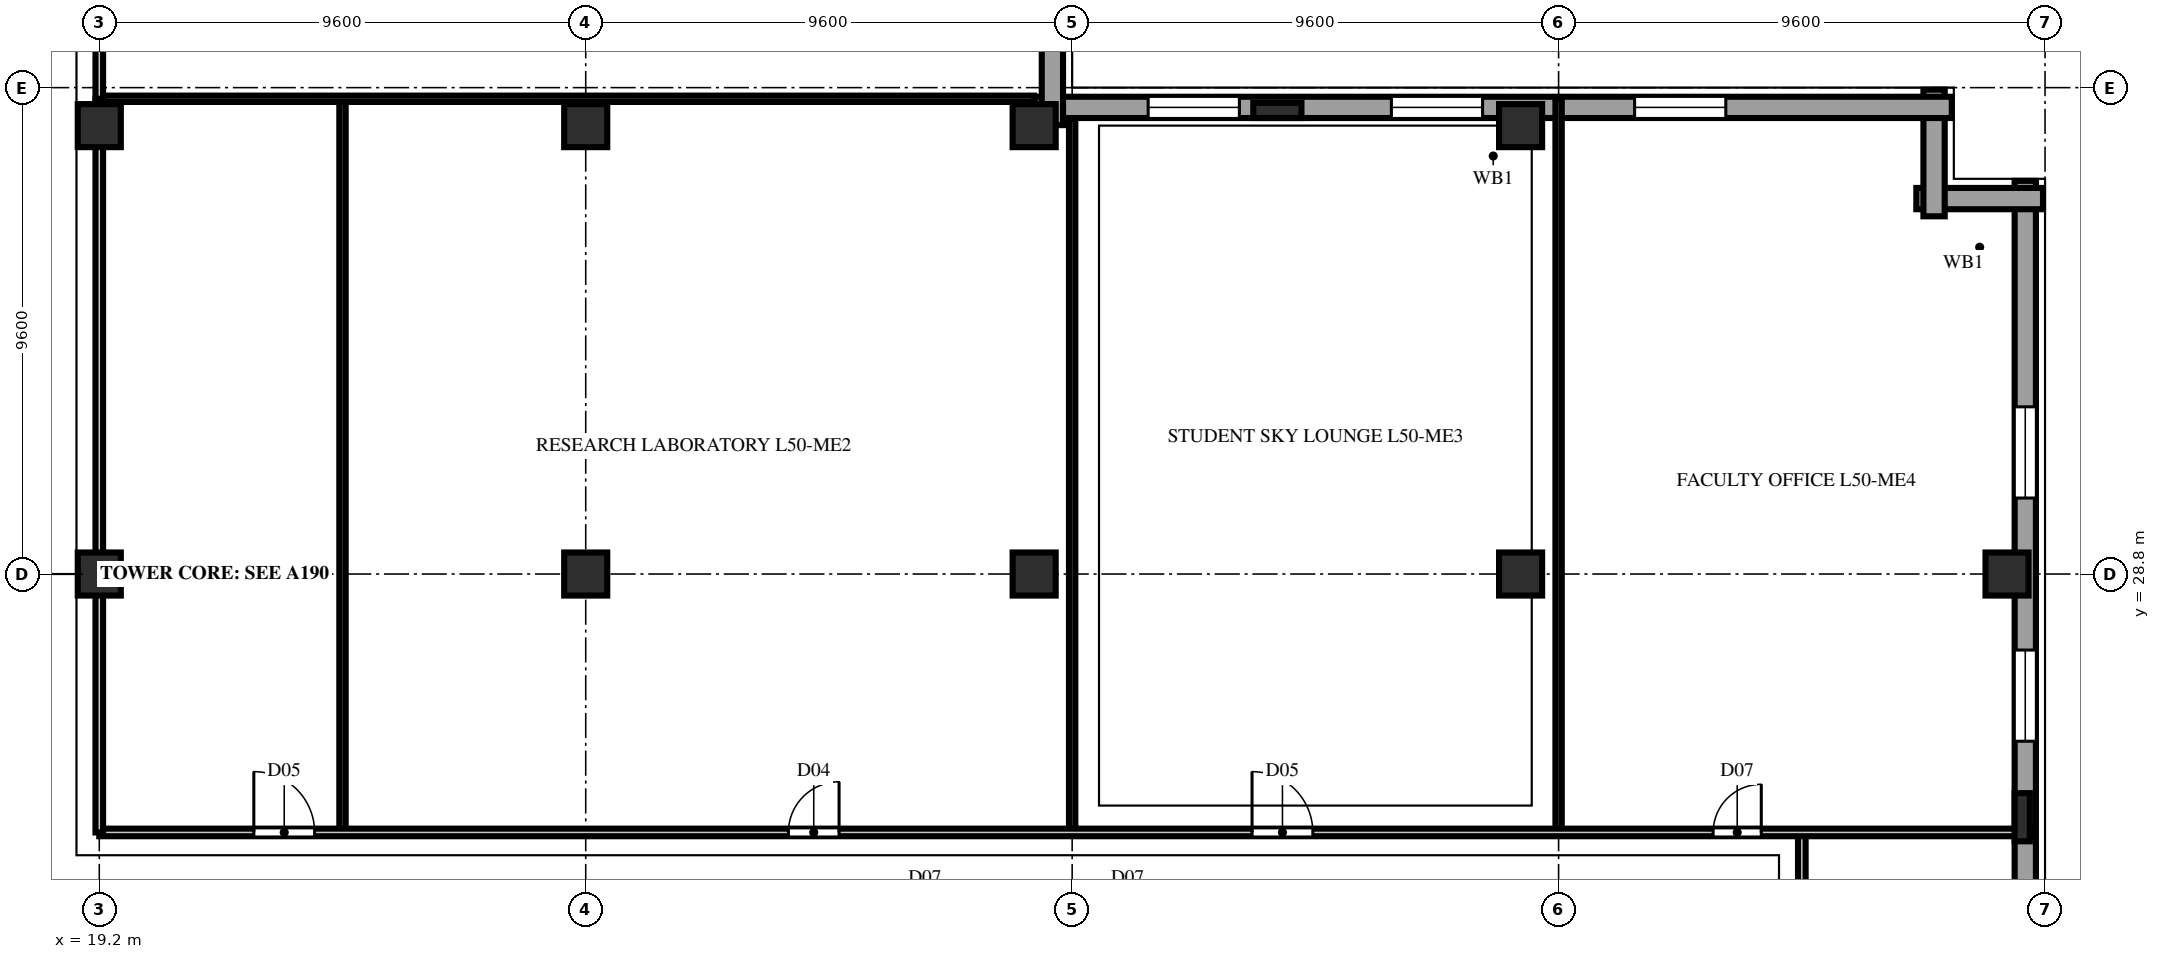
"""IFC4 building model, lengths in metres.
Left out: names, types, materials, properties, quantities, classifications, styles, units other than length and angle.
Written with IfcOpenShell. Run it as: python <this file> out.ifc"""

import sys

from ifc_helpers import new_model, si_unit, direction, frame, frame_2d, origin, origin_2d, place, context, subcontext, project, spatial, rectangle, extrude, element, fill, save


model = new_model("IFC4")
c1 = context("Model", 3, precision=1e-05, world=origin(), true_north=direction((0.0, 1.0)))
c2 = subcontext(c1, "Body", "Model", "MODEL_VIEW")
j1 = project(units=[si_unit("LENGTHUNIT", "METRE"), si_unit("PLANEANGLEUNIT", "RADIAN")], contexts=[c1])
p1 = place(None, origin())
s1 = spatial("IfcSite", under=j1, at=p1, CompositionType="ELEMENT")
p2 = place(p1, origin())
s2 = spatial("IfcBuilding", under=s1, at=p2, CompositionType="ELEMENT")
p3 = place(p2, frame((0.0, 0.0, 199.0)))
s3 = spatial("IfcBuildingStorey", under=s2, at=p3, CompositionType="ELEMENT", Elevation=199.0)
for number, where, z_axis, x_axis in (
    (1, (19.2, 28.8, 0.0), (0.0, 0.0, 1.0), (1.0, 0.0, 0.0)),
    (2, (19.2, 37.65, 0.0), (0.0, 0.0, 1.0), (1.0, 0.0, 0.0)),
    (3, (28.8, 28.8, 0.0), (0.0, 0.0, 1.0), (1.0, 0.0, 0.0)),
    (4, (28.8, 37.65, 0.0), (0.0, 0.0, 1.0), (1.0, 0.0, 0.0)),
    (5, (37.65, 28.8, 0.0), (0.0, 0.0, 1.0), (1.0, 0.0, 0.0)),
    (6, (37.65, 37.65, 0.0), (0.0, 0.0, 1.0), (1.0, 0.0, 0.0)),
    (7, (47.25, 28.8, 0.0), (0.0, 0.0, 1.0), (1.0, 0.0, 0.0)),
    (8, (47.25, 37.65, 0.0), (0.0, 0.0, 1.0), (1.0, 0.0, 0.0)),
    (9, (56.85, 28.8, 0.0), (0.0, 0.0, 1.0), (1.0, 0.0, 0.0)),
):
    element("IfcColumn", number, at=place(p3, frame(where, z_axis=z_axis, x_axis=x_axis)), inside=s3, PredefinedType="COLUMN", context=c2, shape_type="SweptSolid", body=[
        extrude(rectangle(XDim=0.85, YDim=0.85, at=origin_2d()), origin(), (0.0, 0.0, 1.0), 3.8),
    ])
for number, where, z_axis, x_axis in (
    (10, (57.15, 24.0, 0.0), (0.0, 0.0, 1.0), (0.0, 1.0, 0.0)),
    (11, (42.45, 37.95, 0.0), (0.0, 0.0, 1.0), (1.0, 0.0, 0.0)),
):
    element("IfcColumn", number, at=place(p3, frame(where, z_axis=z_axis, x_axis=x_axis)), inside=s3, PredefinedType="PILASTER", context=c2, shape_type="SweptSolid", body=[
        extrude(rectangle(XDim=0.95, YDim=0.3, at=origin_2d()), origin(), (0.0, 0.0, 1.0), 3.8),
    ])
p4 = place(p3, frame((57.21, 1.84, 0.0), z_axis=(0.0, 0.0, 1.0), x_axis=(0.0, 1.0, 0.0)))
e12 = element("IfcWall", 12, at=p4, inside=s3, PredefinedType="SOLIDWALL", context=c2, shape_type="SweptSolid", body=[
    extrude(rectangle(XDim=34.72, YDim=0.42, at=frame_2d((17.36, 0.0))), origin(), (0.0, 0.0, 1.0), 3.54),
])
p5 = place(p4, frame((4.46, 0.0, 0.85)))
e13 = element("IfcOpeningElement", 13, at=p5, cuts=e12, PredefinedType="OPENING", context=c2, shape_type="SweptSolid", body=[
    extrude(rectangle(XDim=1.8, YDim=1.85, at=frame_2d((0.9, 0.925))), frame((0.0, 0.222, 0.0), z_axis=(0.0, -1.0, 0.0), x_axis=(1.0, 0.0, 0.0)), (0.0, 0.0, 1.0), 0.444),
])
p6 = place(p4, frame((9.26, 0.0, 0.85)))
e14 = element("IfcOpeningElement", 14, at=p6, cuts=e12, PredefinedType="OPENING", context=c2, shape_type="SweptSolid", body=[
    extrude(rectangle(XDim=1.8, YDim=1.85, at=frame_2d((0.9, 0.925))), frame((0.0, 0.222, 0.0), z_axis=(0.0, -1.0, 0.0), x_axis=(1.0, 0.0, 0.0)), (0.0, 0.0, 1.0), 0.444),
])
p7 = place(p4, frame((14.06, 0.0, 0.85)))
e15 = element("IfcOpeningElement", 15, at=p7, cuts=e12, PredefinedType="OPENING", context=c2, shape_type="SweptSolid", body=[
    extrude(rectangle(XDim=1.8, YDim=1.85, at=frame_2d((0.9, 0.925))), frame((0.0, 0.222, 0.0), z_axis=(0.0, -1.0, 0.0), x_axis=(1.0, 0.0, 0.0)), (0.0, 0.0, 1.0), 0.444),
])
p8 = place(p4, frame((23.66, 0.0, 0.85)))
e16 = element("IfcOpeningElement", 16, at=p8, cuts=e12, PredefinedType="OPENING", context=c2, shape_type="SweptSolid", body=[
    extrude(rectangle(XDim=1.8, YDim=1.85, at=frame_2d((0.9, 0.925))), frame((0.0, 0.222, 0.0), z_axis=(0.0, -1.0, 0.0), x_axis=(1.0, 0.0, 0.0)), (0.0, 0.0, 1.0), 0.444),
])
p9 = place(p4, frame((28.46, 0.0, 0.85)))
e17 = element("IfcOpeningElement", 17, at=p9, cuts=e12, PredefinedType="OPENING", context=c2, shape_type="SweptSolid", body=[
    extrude(rectangle(XDim=1.8, YDim=1.85, at=frame_2d((0.9, 0.925))), frame((0.0, 0.222, 0.0), z_axis=(0.0, -1.0, 0.0), x_axis=(1.0, 0.0, 0.0)), (0.0, 0.0, 1.0), 0.444),
])
for number, where, z_axis, x_axis in (
    (18, (57.56, 36.21, 0.0), (0.0, 0.0, 1.0), (-1.0, 0.0, 0.0)),
    (19, (55.41, 35.86, 0.0), (0.0, 0.0, 1.0), (0.0, 1.0, 0.0)),
):
    element("IfcWall", number, at=place(p3, frame(where, z_axis=z_axis, x_axis=x_axis)), inside=s3, PredefinedType="SOLIDWALL", context=c2, shape_type="SweptSolid", body=[
        extrude(rectangle(XDim=2.5, YDim=0.42, at=frame_2d((1.25, 0.0))), origin(), (0.0, 0.0, 1.0), 3.54),
    ])
p10 = place(p3, frame((55.76, 38.01, 0.0), z_axis=(0.0, 0.0, 1.0), x_axis=(-1.0, 0.0, 0.0)))
e20 = element("IfcWall", 20, at=p10, inside=s3, PredefinedType="SOLIDWALL", context=c2, shape_type="SweptSolid", body=[
    extrude(rectangle(XDim=18.1, YDim=0.42, at=frame_2d((9.05, 0.0))), origin(), (0.0, 0.0, 1.0), 3.54),
])
p11 = place(p10, frame((4.46, 0.0, 0.85)))
e21 = element("IfcOpeningElement", 21, at=p11, cuts=e20, PredefinedType="OPENING", context=c2, shape_type="SweptSolid", body=[
    extrude(rectangle(XDim=1.8, YDim=1.85, at=frame_2d((0.9, 0.925))), frame((0.0, 0.222, 0.0), z_axis=(0.0, -1.0, 0.0), x_axis=(1.0, 0.0, 0.0)), (0.0, 0.0, 1.0), 0.444),
])
p12 = place(p10, frame((9.26, 0.0, 0.85)))
e22 = element("IfcOpeningElement", 22, at=p12, cuts=e20, PredefinedType="OPENING", context=c2, shape_type="SweptSolid", body=[
    extrude(rectangle(XDim=1.8, YDim=1.85, at=frame_2d((0.9, 0.925))), frame((0.0, 0.222, 0.0), z_axis=(0.0, -1.0, 0.0), x_axis=(1.0, 0.0, 0.0)), (0.0, 0.0, 1.0), 0.444),
])
p13 = place(p10, frame((14.06, 0.0, 0.85)))
e23 = element("IfcOpeningElement", 23, at=p13, cuts=e20, PredefinedType="OPENING", context=c2, shape_type="SweptSolid", body=[
    extrude(rectangle(XDim=1.8, YDim=1.85, at=frame_2d((0.9, 0.925))), frame((0.0, 0.222, 0.0), z_axis=(0.0, -1.0, 0.0), x_axis=(1.0, 0.0, 0.0)), (0.0, 0.0, 1.0), 0.444),
])
p14 = place(p3, frame((38.01, 37.66, 0.0), z_axis=(0.0, 0.0, 1.0), x_axis=(0.0, 1.0, 0.0)))
e24 = element("IfcWall", 24, at=p14, inside=s3, PredefinedType="SOLIDWALL", context=c2, shape_type="SweptSolid", body=[
    extrude(rectangle(XDim=18.1, YDim=0.42, at=frame_2d((9.05, 0.0))), origin(), (0.0, 0.0, 1.0), 3.54),
])
p15 = place(p14, frame((2.24, 0.0, 0.85)))
e25 = element("IfcOpeningElement", 25, at=p15, cuts=e24, PredefinedType="OPENING", context=c2, shape_type="SweptSolid", body=[
    extrude(rectangle(XDim=1.8, YDim=1.85, at=frame_2d((0.9, 0.925))), frame((0.0, 0.222, 0.0), z_axis=(0.0, -1.0, 0.0), x_axis=(1.0, 0.0, 0.0)), (0.0, 0.0, 1.0), 0.444),
])
p16 = place(p14, frame((7.04, 0.0, 0.85)))
e26 = element("IfcOpeningElement", 26, at=p16, cuts=e24, PredefinedType="OPENING", context=c2, shape_type="SweptSolid", body=[
    extrude(rectangle(XDim=1.8, YDim=1.85, at=frame_2d((0.9, 0.925))), frame((0.0, 0.222, 0.0), z_axis=(0.0, -1.0, 0.0), x_axis=(1.0, 0.0, 0.0)), (0.0, 0.0, 1.0), 0.444),
])
p17 = place(p14, frame((11.84, 0.0, 0.85)))
e27 = element("IfcOpeningElement", 27, at=p17, cuts=e24, PredefinedType="OPENING", context=c2, shape_type="SweptSolid", body=[
    extrude(rectangle(XDim=1.8, YDim=1.85, at=frame_2d((0.9, 0.925))), frame((0.0, 0.222, 0.0), z_axis=(0.0, -1.0, 0.0), x_axis=(1.0, 0.0, 0.0)), (0.0, 0.0, 1.0), 0.444),
])
p18 = place(p3, frame((52.8, 21.6, 0.0), z_axis=(0.0, 0.0, 1.0), x_axis=(0.0, 1.0, 0.0)))
e28 = element("IfcWall", 28, at=p18, inside=s3, PredefinedType="PARTITIONING", context=c2, shape_type="SweptSolid", body=[
    extrude(rectangle(XDim=2.1, YDim=0.15, at=frame_2d((1.05, 0.0))), origin(), (0.0, 0.0, 1.0), 3.54),
])
p19 = place(p3, frame((24.0, 23.7, 0.0), z_axis=(0.0, 0.0, 1.0), x_axis=(0.0, 1.0, 0.0)))
e29 = element("IfcWall", 29, at=p19, inside=s3, PredefinedType="PARTITIONING", context=c2, shape_type="SweptSolid", body=[
    extrude(rectangle(XDim=14.48, YDim=0.125, at=frame_2d((7.24, 0.0))), origin(), (0.0, 0.0, 1.0), 3.007),
])
p20 = place(p3, frame((38.4, 23.7, 0.0), z_axis=(0.0, 0.0, 1.0), x_axis=(0.0, 1.0, 0.0)))
e30 = element("IfcWall", 30, at=p20, inside=s3, PredefinedType="PARTITIONING", context=c2, shape_type="SweptSolid", body=[
    extrude(rectangle(XDim=14.09, YDim=0.125, at=frame_2d((7.045, 0.0))), origin(), (0.0, 0.0, 1.0), 3.54),
])
p21 = place(p3, frame((48.0, 23.7, 0.0), z_axis=(0.0, 0.0, 1.0), x_axis=(0.0, 1.0, 0.0)))
e31 = element("IfcWall", 31, at=p21, inside=s3, PredefinedType="PARTITIONING", context=c2, shape_type="SweptSolid", body=[
    extrude(rectangle(XDim=14.48, YDim=0.125, at=frame_2d((7.24, 0.0))), origin(), (0.0, 0.0, 1.0), 3.54),
])
p22 = place(p3, frame((19.2, 23.7, 0.0), z_axis=(0.0, 0.0, 1.0), x_axis=(1.0, 0.0, 0.0)))
e32 = element("IfcWall", 32, at=p22, inside=s3, PredefinedType="PARTITIONING", context=c2, shape_type="SweptSolid", body=[
    extrude(rectangle(XDim=38.18, YDim=0.15, at=frame_2d((19.09, 0.0))), origin(), (0.0, 0.0, 1.0), 3.54),
])
p23 = place(p22, frame((3.05, 0.0, 0.0)))
e33 = element("IfcOpeningElement", 33, at=p23, cuts=e32, PredefinedType="OPENING", context=c2, shape_type="SweptSolid", body=[
    extrude(rectangle(XDim=1.2, YDim=2.2, at=frame_2d((0.6, 1.1))), frame((0.0, 0.087, 0.0), z_axis=(0.0, -1.0, 0.0), x_axis=(1.0, 0.0, 0.0)), (0.0, 0.0, 1.0), 0.174),
])
p24 = place(p22, frame((13.6, 0.0, 0.0)))
e34 = element("IfcOpeningElement", 34, at=p24, cuts=e32, PredefinedType="OPENING", context=c2, shape_type="SweptSolid", body=[
    extrude(rectangle(XDim=1.0, YDim=2.2, at=frame_2d((0.5, 1.1))), frame((0.0, 0.087, 0.0), z_axis=(0.0, -1.0, 0.0), x_axis=(1.0, 0.0, 0.0)), (0.0, 0.0, 1.0), 0.174),
])
p25 = place(p22, frame((22.75, 0.0, 0.0)))
e35 = element("IfcOpeningElement", 35, at=p25, cuts=e32, PredefinedType="OPENING", context=c2, shape_type="SweptSolid", body=[
    extrude(rectangle(XDim=1.2, YDim=2.2, at=frame_2d((0.6, 1.1))), frame((0.0, 0.087, 0.0), z_axis=(0.0, -1.0, 0.0), x_axis=(1.0, 0.0, 0.0)), (0.0, 0.0, 1.0), 0.174),
])
p26 = place(p22, frame((31.85, 0.0, 0.0)))
e36 = element("IfcOpeningElement", 36, at=p26, cuts=e32, PredefinedType="OPENING", context=c2, shape_type="SweptSolid", body=[
    extrude(rectangle(XDim=0.95, YDim=2.15, at=frame_2d((0.475, 1.075))), frame((0.0, 0.087, 0.0), z_axis=(0.0, -1.0, 0.0), x_axis=(1.0, 0.0, 0.0)), (0.0, 0.0, 1.0), 0.174),
])
p27 = place(p3, frame((19.2, 23.7, 0.0), z_axis=(0.0, 0.0, 1.0), x_axis=(0.0, 1.0, 0.0)))
e37 = element("IfcWall", 37, at=p27, inside=s3, PredefinedType="PARTITIONING", context=c2, shape_type="SweptSolid", body=[
    extrude(rectangle(XDim=14.48, YDim=0.15, at=frame_2d((7.24, 0.0))), origin(), (0.0, 0.0, 1.0), 2.996),
])
p28 = place(p3, frame((19.28, 38.18, 0.0), z_axis=(0.0, 0.0, 1.0), x_axis=(1.0, 0.0, 0.0)))
e38 = element("IfcWall", 38, at=p28, inside=s3, PredefinedType="PARTITIONING", context=c2, shape_type="SweptSolid", body=[
    extrude(rectangle(XDim=18.37, YDim=0.125, at=frame_2d((9.185, 0.0))), origin(), (0.0, 0.0, 1.0), 3.54),
])
p29 = place(p3, frame((19.2, 38.18, 0.0), z_axis=(0.0, 0.0, 1.0), x_axis=(0.0, 1.0, 0.0)))
e39 = element("IfcWall", 39, at=p29, inside=s3, PredefinedType="PARTITIONING", context=c2, shape_type="SweptSolid", body=[
    extrude(rectangle(XDim=10.07, YDim=0.15, at=frame_2d((5.035, 0.0))), origin(), (0.0, 0.0, 1.0), 2.996),
])
p30 = place(p29, frame((3.85, 0.0, 0.0)))
e40 = element("IfcOpeningElement", 40, at=p30, cuts=e39, PredefinedType="OPENING", context=c2, shape_type="SweptSolid", body=[
    extrude(rectangle(XDim=0.95, YDim=2.15, at=frame_2d((0.475, 1.075))), frame((0.0, 0.087, 0.0), z_axis=(0.0, -1.0, 0.0), x_axis=(1.0, 0.0, 0.0)), (0.0, 0.0, 1.0), 0.174),
])
p31 = place(p8, origin())
e41 = element("IfcWindow", 41, at=p31, inside=s3, PartitioningType="DOUBLE_PANEL_VERTICAL", PredefinedType="WINDOW", context=c2, shape_type="SweptSolid", body=[
    extrude(rectangle(XDim=1.8, YDim=1.85, at=frame_2d((0.9, 0.925))), frame((0.0, 0.11, 0.0), z_axis=(0.0, -1.0, 0.0), x_axis=(1.0, 0.0, 0.0)), (0.0, 0.0, 1.0), 0.06),
])
fill(e16, e41)
p32 = place(p9, origin())
e42 = element("IfcWindow", 42, at=p32, inside=s3, PartitioningType="DOUBLE_PANEL_VERTICAL", PredefinedType="WINDOW", context=c2, shape_type="SweptSolid", body=[
    extrude(rectangle(XDim=1.8, YDim=1.85, at=frame_2d((0.9, 0.925))), frame((0.0, 0.11, 0.0), z_axis=(0.0, -1.0, 0.0), x_axis=(1.0, 0.0, 0.0)), (0.0, 0.0, 1.0), 0.06),
])
fill(e17, e42)
p33 = place(p11, origin())
e43 = element("IfcWindow", 43, at=p33, inside=s3, PartitioningType="DOUBLE_PANEL_VERTICAL", PredefinedType="WINDOW", context=c2, shape_type="SweptSolid", body=[
    extrude(rectangle(XDim=1.8, YDim=1.85, at=frame_2d((0.9, 0.925))), frame((0.0, 0.11, 0.0), z_axis=(0.0, -1.0, 0.0), x_axis=(1.0, 0.0, 0.0)), (0.0, 0.0, 1.0), 0.06),
])
fill(e21, e43)
p34 = place(p12, origin())
e44 = element("IfcWindow", 44, at=p34, inside=s3, PartitioningType="DOUBLE_PANEL_VERTICAL", PredefinedType="WINDOW", context=c2, shape_type="SweptSolid", body=[
    extrude(rectangle(XDim=1.8, YDim=1.85, at=frame_2d((0.9, 0.925))), frame((0.0, 0.11, 0.0), z_axis=(0.0, -1.0, 0.0), x_axis=(1.0, 0.0, 0.0)), (0.0, 0.0, 1.0), 0.06),
])
fill(e22, e44)
p35 = place(p13, origin())
e45 = element("IfcWindow", 45, at=p35, inside=s3, PartitioningType="DOUBLE_PANEL_VERTICAL", PredefinedType="WINDOW", context=c2, shape_type="SweptSolid", body=[
    extrude(rectangle(XDim=1.8, YDim=1.85, at=frame_2d((0.9, 0.925))), frame((0.0, 0.11, 0.0), z_axis=(0.0, -1.0, 0.0), x_axis=(1.0, 0.0, 0.0)), (0.0, 0.0, 1.0), 0.06),
])
fill(e23, e45)
p36 = place(p23, origin())
e46 = element("IfcDoor", 46, at=p36, inside=s3, OperationType="SINGLE_SWING_LEFT", PredefinedType="DOOR", context=c2, shape_type="SweptSolid", body=[
    extrude(rectangle(XDim=1.2, YDim=2.2, at=frame_2d((0.6, 1.1))), frame((0.0, 0.025, 0.0), z_axis=(0.0, -1.0, 0.0), x_axis=(1.0, 0.0, 0.0)), (0.0, 0.0, 1.0), 0.05),
])
fill(e33, e46)
p37 = place(p24, origin())
e47 = element("IfcDoor", 47, at=p37, inside=s3, OperationType="SINGLE_SWING_RIGHT", PredefinedType="DOOR", context=c2, shape_type="SweptSolid", body=[
    extrude(rectangle(XDim=1.0, YDim=2.2, at=frame_2d((0.5, 1.1))), frame((0.0, 0.025, 0.0), z_axis=(0.0, -1.0, 0.0), x_axis=(1.0, 0.0, 0.0)), (0.0, 0.0, 1.0), 0.05),
])
fill(e34, e47)
p38 = place(p25, origin())
e48 = element("IfcDoor", 48, at=p38, inside=s3, OperationType="SINGLE_SWING_LEFT", PredefinedType="DOOR", context=c2, shape_type="SweptSolid", body=[
    extrude(rectangle(XDim=1.2, YDim=2.2, at=frame_2d((0.6, 1.1))), frame((0.0, 0.025, 0.0), z_axis=(0.0, -1.0, 0.0), x_axis=(1.0, 0.0, 0.0)), (0.0, 0.0, 1.0), 0.05),
])
fill(e35, e48)
p39 = place(p26, origin())
e49 = element("IfcDoor", 49, at=p39, inside=s3, OperationType="SINGLE_SWING_RIGHT", PredefinedType="DOOR", context=c2, shape_type="SweptSolid", body=[
    extrude(rectangle(XDim=0.95, YDim=2.15, at=frame_2d((0.475, 1.075))), frame((0.0, 0.025, 0.0), z_axis=(0.0, -1.0, 0.0), x_axis=(1.0, 0.0, 0.0)), (0.0, 0.0, 1.0), 0.05),
])
fill(e36, e49)
save(model, sys.argv[1])
